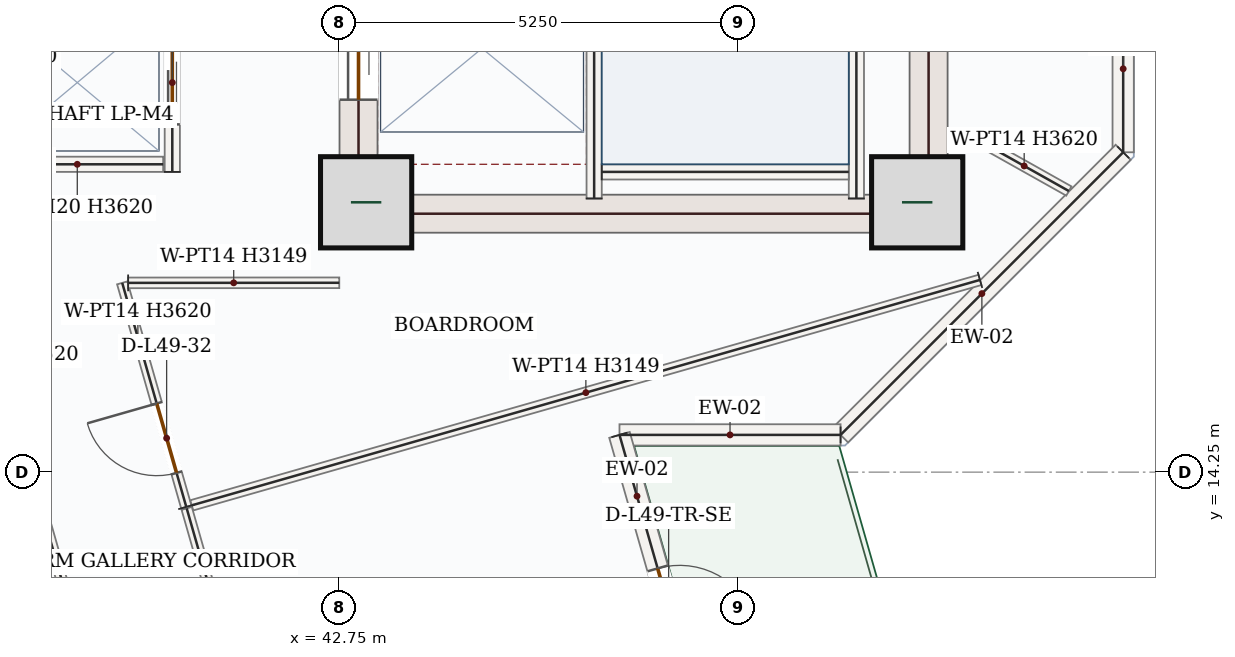
"""IFC4 building model, lengths in metres.
Left out: names, types, materials, properties, quantities, classifications, styles, units other than length and angle.
Written with IfcOpenShell. Run it as: python <this file> out.ifc"""

import sys

from ifc_helpers import new_model, si_unit, direction, frame, frame_2d, origin, origin_2d, place, context, subcontext, project, spatial, rectangle, extrude, source, transform, mapped, element, fill, save


model = new_model("IFC4")
c1 = context("Model", 3, precision=1e-05, world=origin(), true_north=direction((0.0, 1.0)))
c2 = subcontext(c1, "Body", "Model", "MODEL_VIEW")
j1 = project(units=[si_unit("LENGTHUNIT", "METRE"), si_unit("PLANEANGLEUNIT", "RADIAN")], contexts=[c1])
p1 = place(None, origin())
s1 = spatial("IfcSite", under=j1, at=p1, CompositionType="ELEMENT")
p2 = place(p1, origin())
s2 = spatial("IfcBuilding", under=s1, at=p2, CompositionType="ELEMENT")
p3 = place(p2, frame((0.0, 0.0, 209.7)))
s3 = spatial("IfcBuildingStorey", under=s2, at=p3, CompositionType="ELEMENT", Elevation=209.7)
p4 = place(p3, frame((43.0, 17.4, 0.0), z_axis=(0.0, 0.0, 1.0), x_axis=(0.0, 1.0, 0.0)))
e1 = element("IfcWall", 1, at=p4, inside=s3, PredefinedType="SHEAR", context=c2, shape_type="SweptSolid", body=[
    extrude(rectangle(XDim=8.55, YDim=0.5, at=frame_2d((4.275, 0.0))), origin(), (0.0, 0.0, 1.0), 3.62),
])
p5 = place(p4, frame((6.65, 0.0, 0.0)))
e2 = element("IfcOpeningElement", 2, at=p5, cuts=e1, PredefinedType="OPENING", context=c2, shape_type="SweptSolid", body=[
    extrude(rectangle(XDim=1.1, YDim=2.2, at=frame_2d((0.55, 1.1))), frame((0.0, 0.26, 0.0), z_axis=(0.0, -1.0, 0.0), x_axis=(1.0, 0.0, 0.0)), (0.0, 0.0, 1.0), 0.52),
])
p6 = place(p4, frame((1.75, 0.0, 0.0)))
e3 = element("IfcOpeningElement", 3, at=p6, cuts=e1, PredefinedType="OPENING", context=c2, shape_type="SweptSolid", body=[
    extrude(rectangle(XDim=1.3, YDim=2.2, at=frame_2d((0.65, 1.1))), frame((0.0, 0.26, 0.0), z_axis=(0.0, -1.0, 0.0), x_axis=(1.0, 0.0, 0.0)), (0.0, 0.0, 1.0), 0.52),
])
p7 = place(p4, frame((4.3, 0.0, 0.0)))
e4 = element("IfcOpeningElement", 4, at=p7, cuts=e1, PredefinedType="OPENING", context=c2, shape_type="SweptSolid", body=[
    extrude(rectangle(XDim=0.88, YDim=2.1, at=frame_2d((0.44, 1.05))), frame((0.0, 0.26, 0.0), z_axis=(0.0, -1.0, 0.0), x_axis=(1.0, 0.0, 0.0)), (0.0, 0.0, 1.0), 0.52),
])
m1 = source(origin(), c2, "Body", "SweptSolid", [
    extrude(rectangle(XDim=8.55, YDim=0.5, at=frame_2d((4.275, 0.0))), origin(), (0.0, 0.0, 1.0), 3.62),
])
p8 = place(p3, frame((50.5, 17.4, 0.0), z_axis=(0.0, 0.0, 1.0), x_axis=(0.0, 1.0, 0.0)))
e5 = element("IfcWall", 5, at=p8, inside=s3, PredefinedType="SHEAR", context=c2, shape_type="MappedRepresentation", body=[
    mapped(m1, transform((0.0, 0.0, 0.0), x_axis=(1.0, 0.0, 0.0), y_axis=(0.0, 1.0, 0.0), z_axis=(0.0, 0.0, 1.0), scale=1.0)),
])
m2 = source(origin(), c2, "Body", "SweptSolid", [
    extrude(rectangle(XDim=7.0, YDim=0.5, at=frame_2d((3.5, 0.0))), origin(), (0.0, 0.0, 1.0), 3.62),
])
p9 = place(p3, frame((43.25, 17.65, 0.0), z_axis=(0.0, 0.0, 1.0), x_axis=(1.0, 0.0, 0.0)))
e6 = element("IfcWall", 6, at=p9, inside=s3, PredefinedType="SHEAR", context=c2, shape_type="MappedRepresentation", body=[
    mapped(m2, transform((0.0, 0.0, 0.0), x_axis=(1.0, 0.0, 0.0), y_axis=(0.0, 1.0, 0.0), z_axis=(0.0, 0.0, 1.0), scale=1.0)),
])
m3 = source(origin(), c2, "Body", "SweptSolid", [
    extrude(rectangle(XDim=1.2, YDim=1.2, at=origin_2d()), origin(), (0.0, 0.0, 1.0), 3.9),
])
for number, where, z_axis, x_axis in (
    (7, (43.1, 17.8, 0.0), (0.0, 0.0, 1.0), (1.0, 0.0, 0.0)),
    (8, (50.35, 17.8, 0.0), (0.0, 0.0, 1.0), (1.0, 0.0, 0.0)),
):
    element("IfcColumn", number, at=place(p3, frame(where, z_axis=z_axis, x_axis=x_axis)), inside=s3, PredefinedType="COLUMN", context=c2, shape_type="MappedRepresentation", body=[
        mapped(m3, transform((0.0, 0.0, 0.0), x_axis=(1.0, 0.0, 0.0), y_axis=(0.0, 1.0, 0.0), z_axis=(0.0, 0.0, 1.0), scale=1.0)),
    ])
p10 = place(p3, frame((53.06, 24.952, 0.0), z_axis=(0.0, 0.0, 1.0), x_axis=(0.0, -1.0, 0.0)))
e9 = element("IfcWall", 9, at=p10, inside=s3, PredefinedType="SOLIDWALL", context=c2, shape_type="SweptSolid", body=[
    extrude(rectangle(XDim=6.494, YDim=0.28, at=frame_2d((3.247, 0.0))), origin(), (0.0, 0.0, 1.0), 3.62),
])
p11 = place(p10, frame((2.347, 0.0, 0.85)))
e10 = element("IfcOpeningElement", 10, at=p11, cuts=e9, PredefinedType="OPENING", context=c2, shape_type="SweptSolid", body=[
    extrude(rectangle(XDim=1.8, YDim=1.75, at=frame_2d((0.9, 0.875))), frame((0.0, 0.15, 0.0), z_axis=(0.0, -1.0, 0.0), x_axis=(1.0, 0.0, 0.0)), (0.0, 0.0, 1.0), 0.3),
])
m4 = source(origin(), c2, "Body", "SweptSolid", [
    extrude(rectangle(XDim=5.258, YDim=0.28, at=frame_2d((2.629, 0.0))), origin(), (0.0, 0.0, 1.0), 3.62),
])
p12 = place(p3, frame((53.06, 18.458, 0.0), z_axis=(0.0, 0.0, 1.0), x_axis=(-0.707106781187, -0.707106781187, 0.0)))
e11 = element("IfcWall", 11, at=p12, inside=s3, PredefinedType="SOLIDWALL", context=c2, shape_type="MappedRepresentation", body=[
    mapped(m4, transform((0.0, 0.0, 0.0), x_axis=(1.0, 0.0, 0.0), y_axis=(0.0, 1.0, 0.0), z_axis=(0.0, 0.0, 1.0), scale=1.0)),
])
m5 = source(origin(), c2, "Body", "SweptSolid", [
    extrude(rectangle(XDim=2.909, YDim=0.28, at=frame_2d((1.455, 0.0))), origin(), (0.0, 0.0, 1.0), 3.62),
])
p13 = place(p3, frame((49.342, 14.74, 0.0), z_axis=(0.0, 0.0, 1.0), x_axis=(-1.0, 0.0, 0.0)))
e12 = element("IfcWall", 12, at=p13, inside=s3, PredefinedType="SOLIDWALL", context=c2, shape_type="MappedRepresentation", body=[
    mapped(m5, transform((0.0, 0.0, 0.0), x_axis=(1.0, 0.0, 0.0), y_axis=(0.0, 1.0, 0.0), z_axis=(0.0, 0.0, 1.0), scale=1.0)),
])
p14 = place(p3, frame((46.433, 14.74, 0.0), z_axis=(0.0, 0.0, 1.0), x_axis=(0.274981611661, -0.961449485542, 0.0)))
e13 = element("IfcWall", 13, at=p14, inside=s3, PredefinedType="SOLIDWALL", context=c2, shape_type="SweptSolid", body=[
    extrude(rectangle(XDim=4.704, YDim=0.28, at=frame_2d((2.352, 0.0))), origin(), (0.0, 0.0, 1.0), 3.62),
])
p15 = place(p14, frame((1.827, 0.0, 0.0)))
e14 = element("IfcOpeningElement", 14, at=p15, cuts=e13, PredefinedType="OPENING", context=c2, shape_type="SweptSolid", body=[
    extrude(rectangle(XDim=1.05, YDim=2.15, at=frame_2d((0.525, 1.075))), frame((0.0, 0.15, 0.0), z_axis=(0.0, -1.0, 0.0), x_axis=(1.0, 0.0, 0.0)), (0.0, 0.0, 1.0), 0.3),
])
m6 = source(origin(), c2, "Body", "SweptSolid", [
    extrude(rectangle(XDim=7.87, YDim=0.2, at=frame_2d((3.935, 0.0))), origin(), (0.0, 0.0, 1.0), 3.62),
])
p16 = place(p3, frame((49.55, 17.85, 0.0), z_axis=(0.0, 0.0, 1.0), x_axis=(0.0, 1.0, 0.0)))
e15 = element("IfcWall", 15, at=p16, inside=s3, PredefinedType="SOLIDWALL", context=c2, shape_type="MappedRepresentation", body=[
    mapped(m6, transform((0.0, 0.0, 0.0), x_axis=(1.0, 0.0, 0.0), y_axis=(0.0, 1.0, 0.0), z_axis=(0.0, 0.0, 1.0), scale=1.0)),
])
p17 = place(p3, frame((46.1, 17.85, 0.0), z_axis=(0.0, 0.0, 1.0), x_axis=(0.0, 1.0, 0.0)))
e16 = element("IfcWall", 16, at=p17, inside=s3, PredefinedType="SOLIDWALL", context=c2, shape_type="SweptSolid", body=[
    extrude(rectangle(XDim=8.0, YDim=0.2, at=frame_2d((4.0, 0.0))), origin(), (0.0, 0.0, 1.0), 3.62),
])
p18 = place(p17, frame((6.3, 0.0, 0.0)))
e17 = element("IfcOpeningElement", 17, at=p18, cuts=e16, PredefinedType="OPENING", context=c2, shape_type="SweptSolid", body=[
    extrude(rectangle(XDim=1.05, YDim=2.15, at=frame_2d((0.525, 1.075))), frame((0.0, 0.11, 0.0), z_axis=(0.0, -1.0, 0.0), x_axis=(1.0, 0.0, 0.0)), (0.0, 0.0, 1.0), 0.22),
])
m7 = source(origin(), c2, "Body", "SweptSolid", [
    extrude(rectangle(XDim=3.25, YDim=0.2, at=frame_2d((1.625, 0.0))), origin(), (0.0, 0.0, 1.0), 3.62),
])
p19 = place(p3, frame((46.2, 18.2, 0.0), z_axis=(0.0, 0.0, 1.0), x_axis=(1.0, 0.0, 0.0)))
e18 = element("IfcWall", 18, at=p19, inside=s3, PredefinedType="SOLIDWALL", context=c2, shape_type="MappedRepresentation", body=[
    mapped(m7, transform((0.0, 0.0, 0.0), x_axis=(1.0, 0.0, 0.0), y_axis=(0.0, 1.0, 0.0), z_axis=(0.0, 0.0, 1.0), scale=1.0)),
])
p20 = place(p3, frame((40.55, 18.2, 0.0), z_axis=(0.0, 0.0, 1.0), x_axis=(0.0, 1.0, 0.0)))
e19 = element("IfcWall", 19, at=p20, inside=s3, PredefinedType="SOLIDWALL", context=c2, shape_type="SweptSolid", body=[
    extrude(rectangle(XDim=2.35, YDim=0.2, at=frame_2d((1.175, 0.0))), origin(), (0.0, 0.0, 1.0), 3.62),
])
p21 = place(p20, frame((0.625, 0.0, 0.0)))
e20 = element("IfcOpeningElement", 20, at=p21, cuts=e19, PredefinedType="OPENING", context=c2, shape_type="SweptSolid", body=[
    extrude(rectangle(XDim=1.1, YDim=2.15, at=frame_2d((0.55, 1.075))), frame((0.0, 0.11, 0.0), z_axis=(0.0, -1.0, 0.0), x_axis=(1.0, 0.0, 0.0)), (0.0, 0.0, 1.0), 0.22),
])
m8 = source(origin(), c2, "Body", "SweptSolid", [
    extrude(rectangle(XDim=2.26, YDim=0.2, at=frame_2d((1.13, 0.0))), origin(), (0.0, 0.0, 1.0), 3.62),
])
p22 = place(p3, frame((38.17, 18.3, 0.0), z_axis=(0.0, 0.0, 1.0), x_axis=(1.0, 0.0, 0.0)))
e21 = element("IfcWall", 21, at=p22, inside=s3, PredefinedType="SOLIDWALL", context=c2, shape_type="MappedRepresentation", body=[
    mapped(m8, transform((0.0, 0.0, 0.0), x_axis=(1.0, 0.0, 0.0), y_axis=(0.0, 1.0, 0.0), z_axis=(0.0, 0.0, 1.0), scale=1.0)),
])
p23 = place(p3, frame((40.734, 13.792, 0.0), z_axis=(0.0, 0.0, 1.0), x_axis=(-0.274984067599, 0.961448783122, 0.0)))
e22 = element("IfcWall", 22, at=p23, inside=s3, PredefinedType="PARTITIONING", context=c2, shape_type="SweptSolid", body=[
    extrude(rectangle(XDim=3.066, YDim=0.14, at=frame_2d((1.533, 0.0))), origin(), (0.0, 0.0, 1.0), 3.62),
])
p24 = place(p23, frame((0.465, 0.0, 0.0)))
e23 = element("IfcOpeningElement", 23, at=p24, cuts=e22, PredefinedType="OPENING", context=c2, shape_type="SweptSolid", body=[
    extrude(rectangle(XDim=0.95, YDim=2.15, at=frame_2d((0.475, 1.075))), frame((0.0, 0.08, 0.0), z_axis=(0.0, -1.0, 0.0), x_axis=(1.0, 0.0, 0.0)), (0.0, 0.0, 1.0), 0.16),
])
m9 = source(origin(), c2, "Body", "SweptSolid", [
    extrude(rectangle(XDim=2.778, YDim=0.14, at=frame_2d((1.389, 0.0))), origin(), (0.0, 0.0, 1.0), 3.149),
])
p25 = place(p3, frame((39.969, 16.74, 0.0), z_axis=(0.0, 0.0, 1.0), x_axis=(0.999999903427, 0.000439483125, 0.0)))
e24 = element("IfcWall", 24, at=p25, inside=s3, PredefinedType="PARTITIONING", context=c2, shape_type="MappedRepresentation", body=[
    mapped(m9, transform((0.0, 0.0, 0.0), x_axis=(1.0, 0.0, 0.0), y_axis=(0.0, 1.0, 0.0), z_axis=(0.0, 0.0, 1.0), scale=1.0)),
])
m10 = source(origin(), c2, "Body", "SweptSolid", [
    extrude(rectangle(XDim=1.348, YDim=0.14, at=frame_2d((0.674, 0.0))), origin(), (0.0, 0.0, 1.0), 3.62),
])
p26 = place(p3, frame((51.17, 18.608, 0.0), z_axis=(0.0, 0.0, 1.0), x_axis=(0.872029904913, -0.489452597232, 0.0)))
e25 = element("IfcWall", 25, at=p26, inside=s3, PredefinedType="PARTITIONING", context=c2, shape_type="MappedRepresentation", body=[
    mapped(m10, transform((0.0, 0.0, 0.0), x_axis=(1.0, 0.0, 0.0), y_axis=(0.0, 1.0, 0.0), z_axis=(0.0, 0.0, 1.0), scale=1.0)),
])
m11 = source(origin(), c2, "Body", "SweptSolid", [
    extrude(rectangle(XDim=10.785, YDim=0.14, at=frame_2d((5.393, 0.0))), origin(), (0.0, 0.0, 1.0), 3.149),
])
p27 = place(p3, frame((51.176, 16.779, 0.0), z_axis=(0.0, 0.0, 1.0), x_axis=(-0.961454726908, -0.274963285016, 0.0)))
e26 = element("IfcWall", 26, at=p27, inside=s3, PredefinedType="PARTITIONING", context=c2, shape_type="MappedRepresentation", body=[
    mapped(m11, transform((0.0, 0.0, 0.0), x_axis=(1.0, 0.0, 0.0), y_axis=(0.0, 1.0, 0.0), z_axis=(0.0, 0.0, 1.0), scale=1.0)),
])
p28 = place(p3, frame((42.635, 7.144, 0.0), z_axis=(0.0, 0.0, 1.0), x_axis=(-0.274973646468, 0.96145176361, 0.0)))
e27 = element("IfcWall", 27, at=p28, inside=s3, PredefinedType="PARTITIONING", context=c2, shape_type="SweptSolid", body=[
    extrude(rectangle(XDim=6.895, YDim=0.14, at=frame_2d((3.448, 0.0))), origin(), (0.0, 0.0, 1.0), 3.62),
])
p29 = place(p28, frame((4.637, 0.0, 0.0)))
e28 = element("IfcOpeningElement", 28, at=p29, cuts=e27, PredefinedType="OPENING", context=c2, shape_type="SweptSolid", body=[
    extrude(rectangle(XDim=0.95, YDim=2.15, at=frame_2d((0.475, 1.075))), frame((0.0, 0.08, 0.0), z_axis=(0.0, -1.0, 0.0), x_axis=(1.0, 0.0, 0.0)), (0.0, 0.0, 1.0), 0.16),
])
p30 = place(p3, frame((38.723, 14.133, 0.0), z_axis=(0.0, 0.0, 1.0), x_axis=(0.274985856522, -0.96144827147, 0.0)))
e29 = element("IfcWall", 29, at=p30, inside=s3, PredefinedType="PARTITIONING", context=c2, shape_type="SweptSolid", body=[
    extrude(rectangle(XDim=7.795, YDim=0.14, at=frame_2d((3.897, 0.0))), origin(), (0.0, 0.0, 1.0), 3.62),
])
p31 = place(p30, frame((3.423, 0.0, 0.0)))
e30 = element("IfcOpeningElement", 30, at=p31, cuts=e29, PredefinedType="OPENING", context=c2, shape_type="SweptSolid", body=[
    extrude(rectangle(XDim=0.95, YDim=2.15, at=frame_2d((0.475, 1.075))), frame((0.0, 0.08, 0.0), z_axis=(0.0, -1.0, 0.0), x_axis=(1.0, 0.0, 0.0)), (0.0, 0.0, 1.0), 0.16),
])
m12 = source(origin(), c2, "Body", "SweptSolid", [
    extrude(rectangle(XDim=1.05, YDim=2.15, at=frame_2d((0.525, 1.075))), frame((0.0, 0.025, 0.0), z_axis=(0.0, -1.0, 0.0), x_axis=(1.0, 0.0, 0.0)), (0.0, 0.0, 1.0), 0.05),
])
p32 = place(p15, origin())
e31 = element("IfcDoor", 31, at=p32, inside=s3, OperationType="SINGLE_SWING_RIGHT", PredefinedType="DOOR", context=c2, shape_type="MappedRepresentation", body=[
    mapped(m12, transform((0.0, 0.0, 0.0), x_axis=(1.0, 0.0, 0.0), y_axis=(0.0, 1.0, 0.0), z_axis=(0.0, 0.0, 1.0), scale=1.0)),
])
fill(e14, e31)
m13 = source(origin(), c2, "Body", "SweptSolid", [
    extrude(rectangle(XDim=1.3, YDim=2.2, at=frame_2d((0.65, 1.1))), frame((0.0, 0.025, 0.0), z_axis=(0.0, -1.0, 0.0), x_axis=(1.0, 0.0, 0.0)), (0.0, 0.0, 1.0), 0.05),
])
p33 = place(p6, origin())
e32 = element("IfcDoor", 32, at=p33, inside=s3, OperationType="DOUBLE_DOOR_SLIDING", PredefinedType="DOOR", context=c2, shape_type="MappedRepresentation", body=[
    mapped(m13, transform((0.0, 0.0, 0.0), x_axis=(1.0, 0.0, 0.0), y_axis=(0.0, 1.0, 0.0), z_axis=(0.0, 0.0, 1.0), scale=1.0)),
])
fill(e3, e32)
m14 = source(origin(), c2, "Body", "SweptSolid", [
    extrude(rectangle(XDim=1.1, YDim=2.15, at=frame_2d((0.55, 1.075))), frame((0.0, 0.025, 0.0), z_axis=(0.0, -1.0, 0.0), x_axis=(1.0, 0.0, 0.0)), (0.0, 0.0, 1.0), 0.05),
])
p34 = place(p21, origin())
e33 = element("IfcDoor", 33, at=p34, inside=s3, OperationType="DOUBLE_DOOR_SLIDING", PredefinedType="DOOR", context=c2, shape_type="MappedRepresentation", body=[
    mapped(m14, transform((0.0, 0.0, 0.0), x_axis=(1.0, 0.0, 0.0), y_axis=(0.0, 1.0, 0.0), z_axis=(0.0, 0.0, 1.0), scale=1.0)),
])
fill(e20, e33)
m15 = source(origin(), c2, "Body", "SweptSolid", [
    extrude(rectangle(XDim=0.95, YDim=2.15, at=frame_2d((0.475, 1.075))), frame((0.0, 0.025, 0.0), z_axis=(0.0, -1.0, 0.0), x_axis=(1.0, 0.0, 0.0)), (0.0, 0.0, 1.0), 0.05),
])
p35 = place(p24, origin())
e34 = element("IfcDoor", 34, at=p35, inside=s3, OperationType="SINGLE_SWING_RIGHT", PredefinedType="DOOR", context=c2, shape_type="MappedRepresentation", body=[
    mapped(m15, transform((0.0, 0.0, 0.0), x_axis=(1.0, 0.0, 0.0), y_axis=(0.0, 1.0, 0.0), z_axis=(0.0, 0.0, 1.0), scale=1.0)),
])
fill(e23, e34)
save(model, sys.argv[1])
